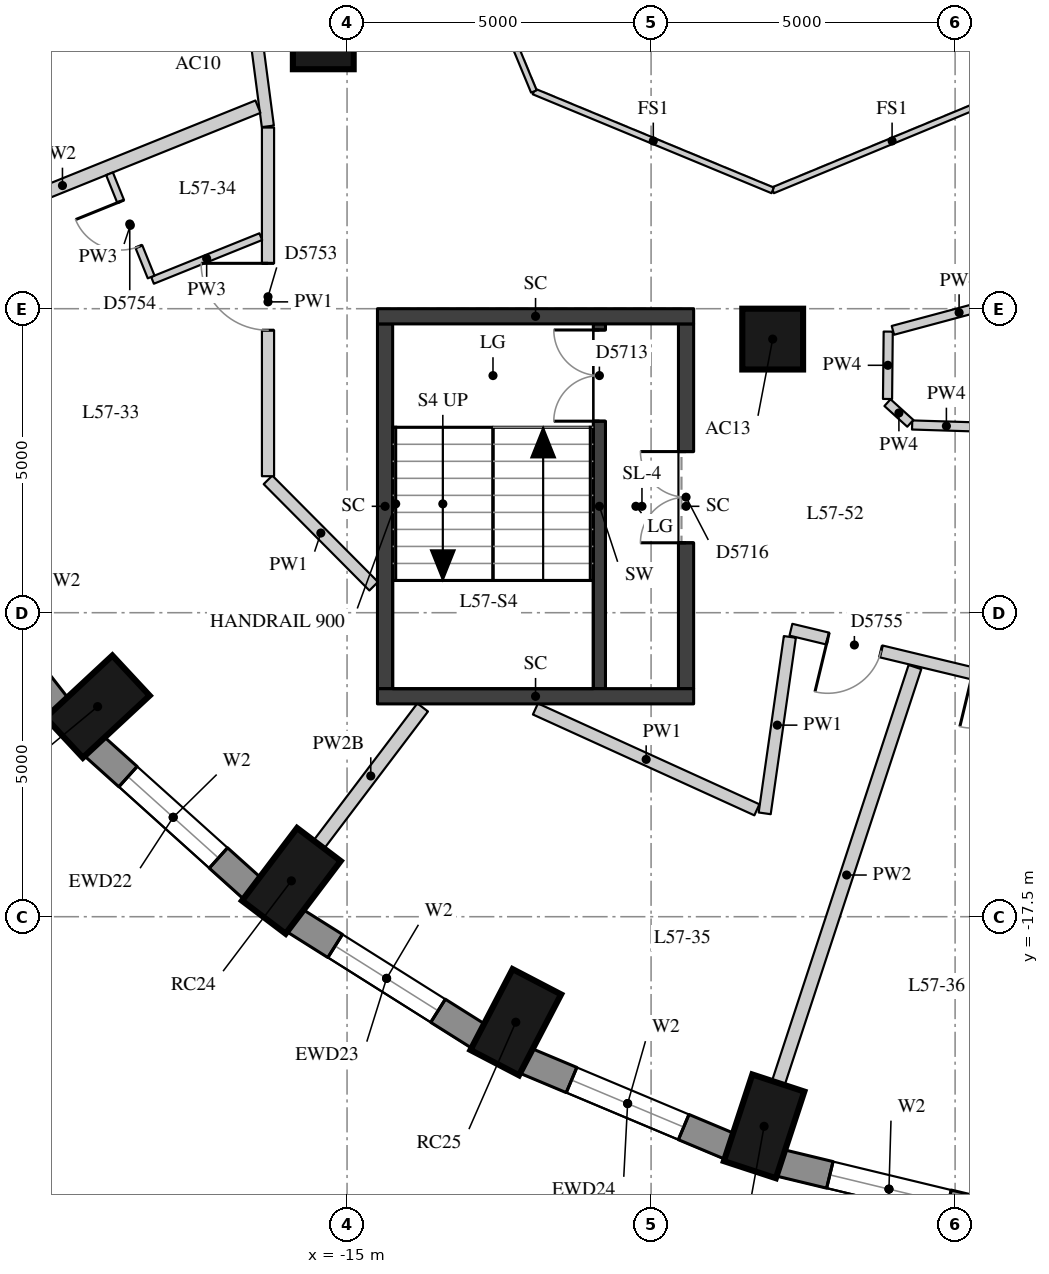
"""IFC4 building model, lengths in metres.
Left out: names, types, materials, properties, quantities, classifications, styles, units other than length and angle.
Written with IfcOpenShell. Run it as: python <this file> out.ifc"""

import sys

from ifc_helpers import new_model, si_unit, direction, frame, frame_2d, origin, origin_2d, place, context, subcontext, project, spatial, rectangle, extrude, element, fill, save


model = new_model("IFC4")
c1 = context("Model", 3, precision=1e-05, world=origin(), true_north=direction((0.0, 1.0)))
c2 = subcontext(c1, "Body", "Model", "MODEL_VIEW")
j1 = project(units=[si_unit("LENGTHUNIT", "METRE"), si_unit("PLANEANGLEUNIT", "RADIAN")], contexts=[c1])
p1 = place(None, origin())
s1 = spatial("IfcSite", under=j1, at=p1, CompositionType="ELEMENT")
p2 = place(p1, origin())
s2 = spatial("IfcBuilding", under=s1, at=p2, CompositionType="ELEMENT")
p3 = place(p2, frame((0.0, 0.0, 202.4)))
s3 = spatial("IfcBuildingStorey", under=s2, at=p3, CompositionType="ELEMENT", Elevation=202.4)
for number, where, z_axis, x_axis in (
    (1, (-19.102, -14.045, 0.0), (0.0, 0.0, 1.0), (-0.732, -0.681, 0.0)),
    (2, (-15.916, -16.911, 0.0), (0.0, 0.0, 1.0), (-0.604, -0.797, 0.0)),
    (3, (-12.225, -19.235, 0.0), (0.0, 0.0, 1.0), (-0.462, -0.887, 0.0)),
    (4, (-8.141, -20.948, 0.0), (0.0, 0.0, 1.0), (-0.312, -0.95, 0.0)),
):
    element("IfcColumn", number, at=place(p3, frame(where, z_axis=z_axis, x_axis=x_axis)), inside=s3, PredefinedType="COLUMN", context=c2, shape_type="SweptSolid", body=[
        extrude(rectangle(XDim=1.5, YDim=0.9, at=origin_2d()), origin(), (0.0, 0.0, 1.0), 3.3),
    ])
for number, where, z_axis, x_axis in (
    (5, (-15.391, -3.062, 0.0), (0.0, 0.0, 1.0), (1.0, 0.0, 0.0)),
    (6, (-8.0, -8.0, 0.0), (0.0, 0.0, 1.0), (1.0, 0.0, 0.0)),
):
    element("IfcColumn", number, at=place(p3, frame(where, z_axis=z_axis, x_axis=x_axis)), inside=s3, PredefinedType="COLUMN", context=c2, shape_type="SweptSolid", body=[
        extrude(rectangle(XDim=1.0, YDim=1.0, at=origin_2d()), origin(), (0.0, 0.0, 1.0), 3.3),
    ])
p4 = place(p3, frame((-21.863, -11.348, 0.0), z_axis=(0.0, 0.0, 1.0), x_axis=(0.614255239631, -0.789107407509, 0.0)))
e7 = element("IfcWall", 7, at=p4, inside=s3, PredefinedType="SOLIDWALL", context=c2, shape_type="SweptSolid", body=[
    extrude(rectangle(XDim=3.438, YDim=0.45, at=frame_2d((1.719, 0.0))), origin(), (0.0, 0.0, 1.0), 3.02),
])
p5 = place(p4, frame((0.719, 0.0, 0.4)))
e8 = element("IfcOpeningElement", 8, at=p5, cuts=e7, PredefinedType="OPENING", context=c2, shape_type="SweptSolid", body=[
    extrude(rectangle(XDim=2.0, YDim=1.75, at=frame_2d((1.0, 0.875))), frame((0.0, 0.235, 0.0), z_axis=(0.0, -1.0, 0.0), x_axis=(1.0, 0.0, 0.0)), (0.0, 0.0, 1.0), 0.47),
])
p6 = place(p3, frame((-19.165, -14.69, 0.0), z_axis=(0.0, 0.0, 1.0), x_axis=(0.743442727602, -0.668799604348, 0.0)))
e9 = element("IfcWall", 9, at=p6, inside=s3, PredefinedType="SOLIDWALL", context=c2, shape_type="SweptSolid", body=[
    extrude(rectangle(XDim=3.513, YDim=0.45, at=frame_2d((1.756, 0.0))), origin(), (0.0, 0.0, 1.0), 3.02),
])
p7 = place(p6, frame((0.756, 0.0, 0.4)))
e10 = element("IfcOpeningElement", 10, at=p7, cuts=e9, PredefinedType="OPENING", context=c2, shape_type="SweptSolid", body=[
    extrude(rectangle(XDim=2.0, YDim=1.75, at=frame_2d((1.0, 0.875))), frame((0.0, 0.235, 0.0), z_axis=(0.0, -1.0, 0.0), x_axis=(1.0, 0.0, 0.0)), (0.0, 0.0, 1.0), 0.47),
])
p8 = place(p3, frame((-15.867, -17.559, 0.0), z_axis=(0.0, 0.0, 1.0), x_axis=(0.84616917791, -0.532914366813, 0.0)))
e11 = element("IfcWall", 11, at=p8, inside=s3, PredefinedType="SOLIDWALL", context=c2, shape_type="SweptSolid", body=[
    extrude(rectangle(XDim=3.587, YDim=0.45, at=frame_2d((1.793, 0.0))), origin(), (0.0, 0.0, 1.0), 3.02),
])
p9 = place(p8, frame((0.793, 0.0, 0.4)))
e12 = element("IfcOpeningElement", 12, at=p9, cuts=e11, PredefinedType="OPENING", context=c2, shape_type="SweptSolid", body=[
    extrude(rectangle(XDim=2.0, YDim=1.75, at=frame_2d((1.0, 0.875))), frame((0.0, 0.235, 0.0), z_axis=(0.0, -1.0, 0.0), x_axis=(1.0, 0.0, 0.0)), (0.0, 0.0, 1.0), 0.47),
])
p10 = place(p3, frame((-12.069, -19.867, 0.0), z_axis=(0.0, 0.0, 1.0), x_axis=(0.922168222612, -0.386789050006, 0.0)))
e13 = element("IfcWall", 13, at=p10, inside=s3, PredefinedType="SOLIDWALL", context=c2, shape_type="SweptSolid", body=[
    extrude(rectangle(XDim=3.651, YDim=0.45, at=frame_2d((1.825, 0.0))), origin(), (0.0, 0.0, 1.0), 3.02),
])
p11 = place(p10, frame((0.825, 0.0, 0.4)))
e14 = element("IfcOpeningElement", 14, at=p11, cuts=e13, PredefinedType="OPENING", context=c2, shape_type="SweptSolid", body=[
    extrude(rectangle(XDim=2.0, YDim=1.75, at=frame_2d((1.0, 0.875))), frame((0.0, 0.235, 0.0), z_axis=(0.0, -1.0, 0.0), x_axis=(1.0, 0.0, 0.0)), (0.0, 0.0, 1.0), 0.47),
])
p12 = place(p3, frame((-7.885, -21.547, 0.0), z_axis=(0.0, 0.0, 1.0), x_axis=(0.9721584944, -0.234324266275, 0.0)))
e15 = element("IfcWall", 15, at=p12, inside=s3, PredefinedType="SOLIDWALL", context=c2, shape_type="SweptSolid", body=[
    extrude(rectangle(XDim=3.698, YDim=0.45, at=frame_2d((1.849, 0.0))), origin(), (0.0, 0.0, 1.0), 3.02),
])
p13 = place(p12, frame((0.849, 0.0, 0.4)))
e16 = element("IfcOpeningElement", 16, at=p13, cuts=e15, PredefinedType="OPENING", context=c2, shape_type="SweptSolid", body=[
    extrude(rectangle(XDim=2.0, YDim=1.75, at=frame_2d((1.0, 0.875))), frame((0.0, 0.235, 0.0), z_axis=(0.0, -1.0, 0.0), x_axis=(1.0, 0.0, 0.0)), (0.0, 0.0, 1.0), 0.47),
])
p14 = place(p3, frame((-10.85, -13.75, 0.0), z_axis=(0.0, 0.0, 1.0), x_axis=(0.0, 1.0, 0.0)))
e17 = element("IfcWall", 17, at=p14, inside=s3, PredefinedType="SHEAR", context=c2, shape_type="SweptSolid", body=[
    extrude(rectangle(XDim=6.0, YDim=0.2, at=frame_2d((3.0, 0.0))), origin(), (0.0, 0.0, 1.0), 3.02),
])
p15 = place(p14, frame((4.4, 0.0, 0.0)))
e18 = element("IfcOpeningElement", 18, at=p15, cuts=e17, PredefinedType="OPENING", context=c2, shape_type="SweptSolid", body=[
    extrude(rectangle(XDim=1.5, YDim=2.1, at=frame_2d((0.75, 1.05))), frame((0.0, 0.11, 0.0), z_axis=(0.0, -1.0, 0.0), x_axis=(1.0, 0.0, 0.0)), (0.0, 0.0, 1.0), 0.22),
])
p16 = place(p3, frame((-14.375, -13.75, -0.28), z_axis=(0.0, 0.0, 1.0), x_axis=(0.0, 1.0, 0.0)))
e19 = element("IfcWall", 19, at=p16, inside=s3, PredefinedType="SHEAR", context=c2, shape_type="SweptSolid", body=[
    extrude(rectangle(XDim=6.0, YDim=0.25, at=frame_2d((3.0, 0.0))), origin(), (0.0, 0.0, 1.0), 3.3),
])
p17 = place(p3, frame((-9.425, -13.75, -0.28), z_axis=(0.0, 0.0, 1.0), x_axis=(0.0, 1.0, 0.0)))
e20 = element("IfcWall", 20, at=p17, inside=s3, PredefinedType="SHEAR", context=c2, shape_type="SweptSolid", body=[
    extrude(rectangle(XDim=6.0, YDim=0.25, at=frame_2d((3.0, 0.0))), origin(), (0.0, 0.0, 1.0), 3.3),
])
p18 = place(p17, frame((2.4, 0.0, 0.28)))
e21 = element("IfcOpeningElement", 21, at=p18, cuts=e20, PredefinedType="OPENING", context=c2, shape_type="SweptSolid", body=[
    extrude(rectangle(XDim=1.5, YDim=2.1, at=frame_2d((0.75, 1.05))), frame((0.0, 0.135, 0.0), z_axis=(0.0, -1.0, 0.0), x_axis=(1.0, 0.0, 0.0)), (0.0, 0.0, 1.0), 0.27),
])
for number, where, z_axis, x_axis in (
    (22, (-14.5, -7.625, -0.28), (0.0, 0.0, 1.0), (1.0, 0.0, 0.0)),
    (23, (-14.5, -13.875, -0.28), (0.0, 0.0, 1.0), (1.0, 0.0, 0.0)),
):
    element("IfcWall", number, at=place(p3, frame(where, z_axis=z_axis, x_axis=x_axis)), inside=s3, PredefinedType="SHEAR", context=c2, shape_type="SweptSolid", body=[
        extrude(rectangle(XDim=5.2, YDim=0.25, at=frame_2d((2.6, 0.0))), origin(), (0.0, 0.0, 1.0), 3.3),
    ])
p19 = place(p3, frame((0.602, -14.777, 0.0), z_axis=(0.0, 0.0, 1.0), x_axis=(-0.972266752798, 0.23387467029, 0.0)))
e24 = element("IfcWall", 24, at=p19, inside=s3, PredefinedType="PARTITIONING", context=c2, shape_type="SweptSolid", body=[
    extrude(rectangle(XDim=8.539, YDim=0.2, at=frame_2d((4.27, 0.0))), origin(), (0.0, 0.0, 1.0), 2.42),
])
p20 = place(p19, frame((7.016, 0.0, 0.0)))
e25 = element("IfcOpeningElement", 25, at=p20, cuts=e24, PredefinedType="OPENING", context=c2, shape_type="SweptSolid", body=[
    extrude(rectangle(XDim=0.9, YDim=2.1, at=frame_2d((0.45, 1.05))), frame((0.0, 0.11, 0.0), z_axis=(0.0, -1.0, 0.0), x_axis=(1.0, 0.0, 0.0)), (0.0, 0.0, 1.0), 0.22),
])
p21 = place(p19, frame((4.565, 0.0, 0.0)))
e26 = element("IfcOpeningElement", 26, at=p21, cuts=e24, PredefinedType="OPENING", context=c2, shape_type="SweptSolid", body=[
    extrude(rectangle(XDim=0.9, YDim=2.1, at=frame_2d((0.45, 1.05))), frame((0.0, 0.11, 0.0), z_axis=(0.0, -1.0, 0.0), x_axis=(1.0, 0.0, 0.0)), (0.0, 0.0, 1.0), 0.22),
])
p22 = place(p19, frame((1.78, 0.0, 0.0)))
e27 = element("IfcOpeningElement", 27, at=p22, cuts=e24, PredefinedType="OPENING", context=c2, shape_type="SweptSolid", body=[
    extrude(rectangle(XDim=0.9, YDim=2.1, at=frame_2d((0.45, 1.05))), frame((0.0, 0.11, 0.0), z_axis=(0.0, -1.0, 0.0), x_axis=(1.0, 0.0, 0.0)), (0.0, 0.0, 1.0), 0.22),
])
p23 = place(p3, frame((-7.718, -12.898, 0.0), z_axis=(0.0, 0.0, 1.0), x_axis=(-0.141269756138, -0.989971138974, 0.0)))
e28 = element("IfcWall", 28, at=p23, inside=s3, PredefinedType="PARTITIONING", context=c2, shape_type="SweptSolid", body=[
    extrude(rectangle(XDim=2.931, YDim=0.2, at=frame_2d((1.465, 0.0))), origin(), (0.0, 0.0, 1.0), 3.02),
])
p24 = place(p3, frame((-8.26, -15.742, 0.0), z_axis=(0.0, 0.0, 1.0), x_axis=(-0.910075871217, 0.414441683025, 0.0)))
e29 = element("IfcWall", 29, at=p24, inside=s3, PredefinedType="PARTITIONING", context=c2, shape_type="SweptSolid", body=[
    extrude(rectangle(XDim=4.002, YDim=0.2, at=frame_2d((2.001, 0.0))), origin(), (0.0, 0.0, 1.0), 3.02),
])
p25 = place(p3, frame((-14.562, -12.064, 0.0), z_axis=(0.0, 0.0, 1.0), x_axis=(-0.704826289083, 0.709379942074, 0.0)))
e30 = element("IfcWall", 30, at=p25, inside=s3, PredefinedType="PARTITIONING", context=c2, shape_type="SweptSolid", body=[
    extrude(rectangle(XDim=2.466, YDim=0.2, at=frame_2d((1.233, 0.0))), origin(), (0.0, 0.0, 1.0), 3.02),
])
p26 = place(p3, frame((-16.3, -10.255, 0.0), z_axis=(0.0, 0.0, 1.0), x_axis=(0.0, 1.0, 0.0)))
e31 = element("IfcWall", 31, at=p26, inside=s3, PredefinedType="PARTITIONING", context=c2, shape_type="SweptSolid", body=[
    extrude(rectangle(XDim=5.734, YDim=0.2, at=frame_2d((2.867, 0.0))), origin(), (0.0, 0.0, 1.0), 3.02),
])
p27 = place(p26, frame((2.401, 0.0, 0.0)))
e32 = element("IfcOpeningElement", 32, at=p27, cuts=e31, PredefinedType="OPENING", context=c2, shape_type="SweptSolid", body=[
    extrude(rectangle(XDim=1.1, YDim=2.1, at=frame_2d((0.55, 1.05))), frame((0.0, 0.11, 0.0), z_axis=(0.0, -1.0, 0.0), x_axis=(1.0, 0.0, 0.0)), (0.0, 0.0, 1.0), 0.22),
])
p28 = place(p3, frame((-16.303, -4.501, 0.0), z_axis=(0.0, 0.0, 1.0), x_axis=(-0.130191522351, 0.991488864036, 0.0)))
e33 = element("IfcWall", 33, at=p28, inside=s3, PredefinedType="PARTITIONING", context=c2, shape_type="SweptSolid", body=[
    extrude(rectangle(XDim=8.045, YDim=0.2, at=frame_2d((4.022, 0.0))), origin(), (0.0, 0.0, 1.0), 3.02),
])
p29 = place(p28, frame((2.738, 0.0, 0.0)))
e34 = element("IfcOpeningElement", 34, at=p29, cuts=e33, PredefinedType="OPENING", context=c2, shape_type="SweptSolid", body=[
    extrude(rectangle(XDim=0.9, YDim=2.1, at=frame_2d((0.45, 1.05))), frame((0.0, 0.11, 0.0), z_axis=(0.0, -1.0, 0.0), x_axis=(1.0, 0.0, 0.0)), (0.0, 0.0, 1.0), 0.22),
])
p30 = place(p3, frame((-4.58, -9.447, 0.0), z_axis=(0.0, 0.0, 1.0), x_axis=(-0.999526758156, 0.030761334993, 0.0)))
e35 = element("IfcWall", 35, at=p30, inside=s3, PredefinedType="PARTITIONING", context=c2, shape_type="SweptSolid", body=[
    extrude(rectangle(XDim=1.127, YDim=0.15, at=frame_2d((0.563, 0.0))), origin(), (0.0, 0.0, 1.0), 3.02),
])
p31 = place(p3, frame((-5.736, -9.385, 0.0), z_axis=(0.0, 0.0, 1.0), x_axis=(-0.740919573429, 0.671593765389, 0.0)))
e36 = element("IfcWall", 36, at=p31, inside=s3, PredefinedType="PARTITIONING", context=c2, shape_type="SweptSolid", body=[
    extrude(rectangle(XDim=0.507, YDim=0.15, at=frame_2d((0.253, 0.0))), origin(), (0.0, 0.0, 1.0), 3.02),
])
p32 = place(p3, frame((-6.111, -8.985, 0.0), z_axis=(0.0, 0.0, 1.0), x_axis=(0.010133870444, 0.999948651017, 0.0)))
e37 = element("IfcWall", 37, at=p32, inside=s3, PredefinedType="PARTITIONING", context=c2, shape_type="SweptSolid", body=[
    extrude(rectangle(XDim=1.108, YDim=0.15, at=frame_2d((0.554, 0.0))), origin(), (0.0, 0.0, 1.0), 3.02),
])
p33 = place(p3, frame((-6.023, -7.856, 0.0), z_axis=(0.0, 0.0, 1.0), x_axis=(0.965887119847, 0.25896345633, 0.0)))
e38 = element("IfcWall", 38, at=p33, inside=s3, PredefinedType="PARTITIONING", context=c2, shape_type="SweptSolid", body=[
    extrude(rectangle(XDim=2.254, YDim=0.15, at=frame_2d((1.127, 0.0))), origin(), (0.0, 0.0, 1.0), 3.02),
])
p34 = place(p3, frame((-22.896, -6.771, 0.0), z_axis=(0.0, 0.0, 1.0), x_axis=(0.927377440276, 0.374127095073, 0.0)))
e39 = element("IfcWall", 39, at=p34, inside=s3, PredefinedType="PARTITIONING", context=c2, shape_type="SweptSolid", body=[
    extrude(rectangle(XDim=6.933, YDim=0.22, at=frame_2d((3.467, 0.0))), origin(), (0.0, 0.0, 1.0), 3.02),
])
p35 = place(p3, frame((-15.463, -16.312, 0.0), z_axis=(0.0, 0.0, 1.0), x_axis=(0.603613294085, 0.797277236101, 0.0)))
e40 = element("IfcWall", 40, at=p35, inside=s3, PredefinedType="PARTITIONING", context=c2, shape_type="SweptSolid", body=[
    extrude(rectangle(XDim=2.828, YDim=0.22, at=frame_2d((1.414, 0.0))), origin(), (0.0, 0.0, 1.0), 2.57),
])
p36 = place(p3, frame((-7.907, -20.235, 0.0), z_axis=(0.0, 0.0, 1.0), x_axis=(0.312013837279, 0.950077557543, 0.0)))
e41 = element("IfcWall", 41, at=p36, inside=s3, PredefinedType="PARTITIONING", context=c2, shape_type="SweptSolid", body=[
    extrude(rectangle(XDim=7.201, YDim=0.22, at=frame_2d((3.601, 0.0))), origin(), (0.0, 0.0, 1.0), 3.02),
])
p37 = place(p3, frame((-16.419, -6.315, 0.0), z_axis=(0.0, 0.0, 1.0), x_axis=(-0.927358946461, -0.374172933841, 0.0)))
e42 = element("IfcWall", 42, at=p37, inside=s3, PredefinedType="PARTITIONING", context=c2, shape_type="SweptSolid", body=[
    extrude(rectangle(XDim=1.92, YDim=0.12, at=frame_2d((0.96, 0.0))), origin(), (0.0, 0.0, 1.0), 3.02),
])
p38 = place(p3, frame((-18.222, -6.978, 0.0), z_axis=(0.0, 0.0, 1.0), x_axis=(-0.374218187905, 0.927340685963, 0.0)))
e43 = element("IfcWall", 43, at=p38, inside=s3, PredefinedType="PARTITIONING", context=c2, shape_type="SweptSolid", body=[
    extrude(rectangle(XDim=1.83, YDim=0.12, at=frame_2d((0.915, 0.0))), origin(), (0.0, 0.0, 1.0), 3.02),
])
p39 = place(p38, frame((0.54, 0.0, 0.0)))
e44 = element("IfcOpeningElement", 44, at=p39, cuts=e43, PredefinedType="OPENING", context=c2, shape_type="SweptSolid", body=[
    extrude(rectangle(XDim=0.8, YDim=2.1, at=frame_2d((0.4, 1.05))), frame((0.0, 0.07, 0.0), z_axis=(0.0, -1.0, 0.0), x_axis=(1.0, 0.0, 0.0)), (0.0, 0.0, 1.0), 0.14),
])
for number, where, z_axis, x_axis in (
    (45, (-4.073, -3.927, 0.0), (0.0, 0.0, 1.0), (-0.924, -0.383, 0.0)),
    (46, (-8.0, -5.554, 0.0), (0.0, 0.0, 1.0), (-0.924, 0.383, 0.0)),
    (47, (-11.927, -3.927, 0.0), (0.0, 0.0, 1.0), (-0.383, 0.924, 0.0)),
):
    element("IfcWall", number, at=place(p3, frame(where, z_axis=z_axis, x_axis=x_axis)), inside=s3, PredefinedType="PARTITIONING", context=c2, shape_type="SweptSolid", body=[
        extrude(rectangle(XDim=4.251, YDim=0.1, at=frame_2d((2.125, 0.0))), origin(), (0.0, 0.0, 1.0), 3.02),
    ])
p40 = place(p7, origin())
e48 = element("IfcWindow", 48, at=p40, inside=s3, PartitioningType="SINGLE_PANEL", PredefinedType="WINDOW", context=c2, shape_type="SweptSolid", body=[
    extrude(rectangle(XDim=2.0, YDim=1.75, at=frame_2d((1.0, 0.875))), frame((0.0, 0.035, 0.0), z_axis=(0.0, -1.0, 0.0), x_axis=(1.0, 0.0, 0.0)), (0.0, 0.0, 1.0), 0.06),
])
fill(e10, e48)
p41 = place(p9, origin())
e49 = element("IfcWindow", 49, at=p41, inside=s3, PartitioningType="SINGLE_PANEL", PredefinedType="WINDOW", context=c2, shape_type="SweptSolid", body=[
    extrude(rectangle(XDim=2.0, YDim=1.75, at=frame_2d((1.0, 0.875))), frame((0.0, 0.035, 0.0), z_axis=(0.0, -1.0, 0.0), x_axis=(1.0, 0.0, 0.0)), (0.0, 0.0, 1.0), 0.06),
])
fill(e12, e49)
p42 = place(p11, origin())
e50 = element("IfcWindow", 50, at=p42, inside=s3, PartitioningType="SINGLE_PANEL", PredefinedType="WINDOW", context=c2, shape_type="SweptSolid", body=[
    extrude(rectangle(XDim=2.0, YDim=1.75, at=frame_2d((1.0, 0.875))), frame((0.0, 0.035, 0.0), z_axis=(0.0, -1.0, 0.0), x_axis=(1.0, 0.0, 0.0)), (0.0, 0.0, 1.0), 0.06),
])
fill(e14, e50)
p43 = place(p13, origin())
e51 = element("IfcWindow", 51, at=p43, inside=s3, PartitioningType="SINGLE_PANEL", PredefinedType="WINDOW", context=c2, shape_type="SweptSolid", body=[
    extrude(rectangle(XDim=2.0, YDim=1.75, at=frame_2d((1.0, 0.875))), frame((0.0, 0.035, 0.0), z_axis=(0.0, -1.0, 0.0), x_axis=(1.0, 0.0, 0.0)), (0.0, 0.0, 1.0), 0.06),
])
fill(e16, e51)
p44 = place(p15, origin())
e52 = element("IfcDoor", 52, at=p44, inside=s3, OperationType="DOUBLE_DOOR_SINGLE_SWING", PredefinedType="DOOR", context=c2, shape_type="SweptSolid", body=[
    extrude(rectangle(XDim=1.5, YDim=2.1, at=frame_2d((0.75, 1.05))), frame((0.0, 0.025, 0.0), z_axis=(0.0, -1.0, 0.0), x_axis=(1.0, 0.0, 0.0)), (0.0, 0.0, 1.0), 0.05),
])
fill(e18, e52)
p45 = place(p18, origin())
e53 = element("IfcDoor", 53, at=p45, inside=s3, OperationType="DOUBLE_DOOR_SINGLE_SWING", PredefinedType="DOOR", context=c2, shape_type="SweptSolid", body=[
    extrude(rectangle(XDim=1.5, YDim=2.1, at=frame_2d((0.75, 1.05))), frame((0.0, 0.025, 0.0), z_axis=(0.0, -1.0, 0.0), x_axis=(1.0, 0.0, 0.0)), (0.0, 0.0, 1.0), 0.05),
])
fill(e21, e53)
p46 = place(p27, origin())
e54 = element("IfcDoor", 54, at=p46, inside=s3, OperationType="SINGLE_SWING_RIGHT", PredefinedType="DOOR", context=c2, shape_type="SweptSolid", body=[
    extrude(rectangle(XDim=1.1, YDim=2.1, at=frame_2d((0.55, 1.05))), frame((0.0, 0.025, 0.0), z_axis=(0.0, -1.0, 0.0), x_axis=(1.0, 0.0, 0.0)), (0.0, 0.0, 1.0), 0.05),
])
fill(e32, e54)
p47 = place(p39, origin())
e55 = element("IfcDoor", 55, at=p47, inside=s3, OperationType="SINGLE_SWING_RIGHT", PredefinedType="DOOR", context=c2, shape_type="SweptSolid", body=[
    extrude(rectangle(XDim=0.8, YDim=2.1, at=frame_2d((0.4, 1.05))), frame((0.0, 0.025, 0.0), z_axis=(0.0, -1.0, 0.0), x_axis=(1.0, 0.0, 0.0)), (0.0, 0.0, 1.0), 0.05),
])
fill(e44, e55)
p48 = place(p20, origin())
e56 = element("IfcDoor", 56, at=p48, inside=s3, OperationType="SINGLE_SWING_RIGHT", PredefinedType="DOOR", context=c2, shape_type="SweptSolid", body=[
    extrude(rectangle(XDim=0.9, YDim=2.1, at=frame_2d((0.45, 1.05))), frame((0.0, 0.025, 0.0), z_axis=(0.0, -1.0, 0.0), x_axis=(1.0, 0.0, 0.0)), (0.0, 0.0, 1.0), 0.05),
])
fill(e25, e56)
save(model, sys.argv[1])
